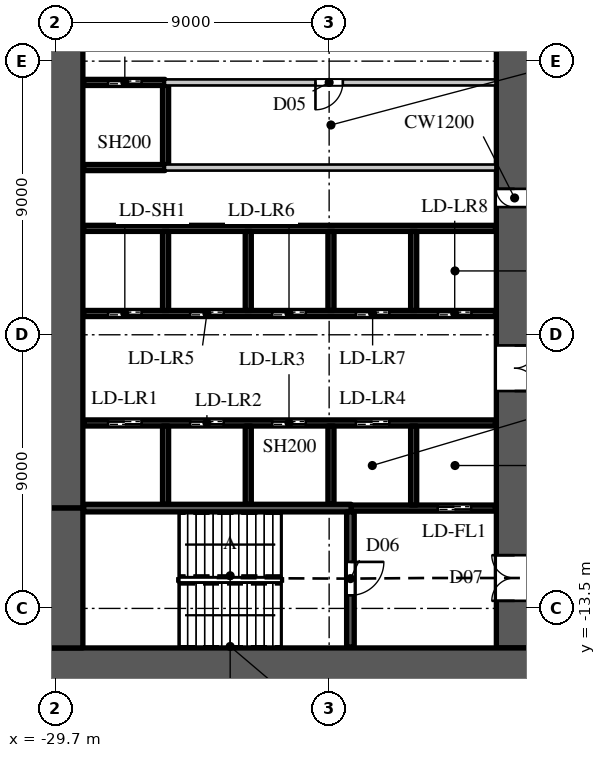
"""IFC4 building model, lengths in metres.
Left out: names, types, materials, properties, quantities, classifications, styles, units other than length and angle.
Written with IfcOpenShell. Run it as: python <this file> out.ifc"""

import sys

from ifc_helpers import new_model, si_unit, direction, frame, frame_2d, origin, place, context, subcontext, project, spatial, rectangle, extrude, element, fill, save


model = new_model("IFC4")
c1 = context("Model", 3, precision=1e-05, world=origin(), true_north=direction((0.0, 1.0)))
c2 = subcontext(c1, "Body", "Model", "MODEL_VIEW")
j1 = project(units=[si_unit("LENGTHUNIT", "METRE"), si_unit("PLANEANGLEUNIT", "RADIAN")], contexts=[c1])
p1 = place(None, origin())
s1 = spatial("IfcSite", under=j1, at=p1, CompositionType="ELEMENT")
p2 = place(p1, origin())
s2 = spatial("IfcBuilding", under=s1, at=p2, CompositionType="ELEMENT")
p3 = place(p2, origin())
s3 = spatial("IfcBuildingStorey", under=s2, at=p3, CompositionType="ELEMENT", Elevation=0.0)
p4 = place(p3, frame((-30.0, -15.4, 0.0), z_axis=(0.0, 0.0, 1.0), x_axis=(1.0, 0.0, 0.0)))
e1 = element("IfcWall", 1, at=p4, inside=s3, PredefinedType="SHEAR", context=c2, shape_type="SweptSolid", body=[
    extrude(rectangle(XDim=16.0, YDim=1.2, at=frame_2d((8.0, 0.0))), origin(), (0.0, 0.0, 1.0), 9.0),
])
p5 = place(p3, frame((-14.6, -14.8, 0.0), z_axis=(0.0, 0.0, 1.0), x_axis=(0.0, 1.0, 0.0)))
e2 = element("IfcWall", 2, at=p5, inside=s3, PredefinedType="SHEAR", context=c2, shape_type="SweptSolid", body=[
    extrude(rectangle(XDim=29.6, YDim=1.2, at=frame_2d((14.8, 0.0))), origin(), (0.0, 0.0, 1.0), 9.0),
])
p6 = place(p5, frame((1.55, 0.0, 0.0)))
e3 = element("IfcOpeningElement", 3, at=p6, cuts=e2, PredefinedType="OPENING", context=c2, shape_type="SweptSolid", body=[
    extrude(rectangle(XDim=1.5, YDim=2.4, at=frame_2d((0.75, 1.2))), frame((0.0, 0.61, 0.0), z_axis=(0.0, -1.0, 0.0), x_axis=(1.0, 0.0, 0.0)), (0.0, 0.0, 1.0), 1.22),
])
p7 = place(p5, frame((26.55, 0.0, 0.0)))
e4 = element("IfcOpeningElement", 4, at=p7, cuts=e2, PredefinedType="OPENING", context=c2, shape_type="SweptSolid", body=[
    extrude(rectangle(XDim=1.5, YDim=2.4, at=frame_2d((0.75, 1.2))), frame((0.0, 0.61, 0.0), z_axis=(0.0, -1.0, 0.0), x_axis=(1.0, 0.0, 0.0)), (0.0, 0.0, 1.0), 1.22),
])
p8 = place(p5, frame((8.45, 0.0, 0.0)))
e5 = element("IfcOpeningElement", 5, at=p8, cuts=e2, PredefinedType="OPENING", context=c2, shape_type="SweptSolid", body=[
    extrude(rectangle(XDim=1.5, YDim=2.4, at=frame_2d((0.75, 1.2))), frame((0.0, 0.61, 0.0), z_axis=(0.0, -1.0, 0.0), x_axis=(1.0, 0.0, 0.0)), (0.0, 0.0, 1.0), 1.22),
])
p9 = place(p5, frame((19.65, 0.0, 0.0)))
e6 = element("IfcOpeningElement", 6, at=p9, cuts=e2, PredefinedType="OPENING", context=c2, shape_type="SweptSolid", body=[
    extrude(rectangle(XDim=1.5, YDim=2.4, at=frame_2d((0.75, 1.2))), frame((0.0, 0.61, 0.0), z_axis=(0.0, -1.0, 0.0), x_axis=(1.0, 0.0, 0.0)), (0.0, 0.0, 1.0), 1.22),
])
p10 = place(p5, frame((14.5, 0.0, 0.0)))
e7 = element("IfcOpeningElement", 7, at=p10, cuts=e2, PredefinedType="OPENING", context=c2, shape_type="SweptSolid", body=[
    extrude(rectangle(XDim=0.6, YDim=2.0, at=frame_2d((0.3, 1.0))), frame((0.0, 0.61, 0.0), z_axis=(0.0, -1.0, 0.0), x_axis=(1.0, 0.0, 0.0)), (0.0, 0.0, 1.0), 1.22),
])
p11 = place(p3, frame((-29.4, -10.2, 0.0), z_axis=(0.0, 0.0, 1.0), x_axis=(0.0, 1.0, 0.0)))
e8 = element("IfcWall", 8, at=p11, inside=s3, PredefinedType="SHEAR", context=c2, shape_type="SweptSolid", body=[
    extrude(rectangle(XDim=20.4, YDim=1.2, at=frame_2d((10.2, 0.0))), origin(), (0.0, 0.0, 1.0), 9.0),
])
p12 = place(p3, frame((-29.4, -14.8, 0.0), z_axis=(0.0, 0.0, 1.0), x_axis=(0.0, 1.0, 0.0)))
e9 = element("IfcWall", 9, at=p12, inside=s3, PredefinedType="SHEAR", context=c2, shape_type="SweptSolid", body=[
    extrude(rectangle(XDim=4.6, YDim=1.2, at=frame_2d((2.3, 0.0))), origin(), (0.0, 0.0, 1.0), 9.0),
])
p13 = place(p3, frame((-26.1, 1.0, 0.0), z_axis=(0.0, 0.0, 1.0), x_axis=(1.0, 0.0, 0.0)))
e10 = element("IfcWall", 10, at=p13, inside=s3, PredefinedType="PARTITIONING", context=c2, shape_type="SweptSolid", body=[
    extrude(rectangle(XDim=10.87, YDim=0.2, at=frame_2d((5.435, 0.0))), origin(), (0.0, 0.0, 1.0), 8.598),
])
p14 = place(p3, frame((-26.1, 3.8, 0.0), z_axis=(0.0, 0.0, 1.0), x_axis=(1.0, 0.0, 0.0)))
e11 = element("IfcWall", 11, at=p14, inside=s3, PredefinedType="PARTITIONING", context=c2, shape_type="SweptSolid", body=[
    extrude(rectangle(XDim=10.87, YDim=0.2, at=frame_2d((5.435, 0.0))), origin(), (0.0, 0.0, 1.0), 8.598),
])
p15 = place(p14, frame((4.95, 0.0, 0.0)))
e12 = element("IfcOpeningElement", 12, at=p15, cuts=e11, PredefinedType="OPENING", context=c2, shape_type="SweptSolid", body=[
    extrude(rectangle(XDim=0.9, YDim=2.2, at=frame_2d((0.45, 1.1))), frame((0.0, 0.11, 0.0), z_axis=(0.0, -1.0, 0.0), x_axis=(1.0, 0.0, 0.0)), (0.0, 0.0, 1.0), 0.22),
])
p16 = place(p3, frame((-28.77, -7.4, 0.0), z_axis=(0.0, 0.0, 1.0), x_axis=(1.0, 0.0, 0.0)))
e13 = element("IfcWall", 13, at=p16, inside=s3, PredefinedType="SHEAR", context=c2, shape_type="SweptSolid", body=[
    extrude(rectangle(XDim=13.54, YDim=0.2, at=frame_2d((6.77, 0.0))), origin(), (0.0, 0.0, 1.0), 8.598),
])
p17 = place(p16, frame((0.8, 0.0, 0.0)))
e14 = element("IfcOpeningElement", 14, at=p17, cuts=e13, PredefinedType="OPENING", context=c2, shape_type="SweptSolid", body=[
    extrude(rectangle(XDim=1.1, YDim=2.2, at=frame_2d((0.55, 1.1))), frame((0.0, 0.11, 0.0), z_axis=(0.0, -1.0, 0.0), x_axis=(1.0, 0.0, 0.0)), (0.0, 0.0, 1.0), 0.22),
])
p18 = place(p16, frame((3.5, 0.0, 0.0)))
e15 = element("IfcOpeningElement", 15, at=p18, cuts=e13, PredefinedType="OPENING", context=c2, shape_type="SweptSolid", body=[
    extrude(rectangle(XDim=1.1, YDim=2.2, at=frame_2d((0.55, 1.1))), frame((0.0, 0.11, 0.0), z_axis=(0.0, -1.0, 0.0), x_axis=(1.0, 0.0, 0.0)), (0.0, 0.0, 1.0), 0.22),
])
p19 = place(p16, frame((6.2, 0.0, 0.0)))
e16 = element("IfcOpeningElement", 16, at=p19, cuts=e13, PredefinedType="OPENING", context=c2, shape_type="SweptSolid", body=[
    extrude(rectangle(XDim=1.1, YDim=2.2, at=frame_2d((0.55, 1.1))), frame((0.0, 0.11, 0.0), z_axis=(0.0, -1.0, 0.0), x_axis=(1.0, 0.0, 0.0)), (0.0, 0.0, 1.0), 0.22),
])
p20 = place(p16, frame((8.95, 0.0, 0.0)))
e17 = element("IfcOpeningElement", 17, at=p20, cuts=e13, PredefinedType="OPENING", context=c2, shape_type="SweptSolid", body=[
    extrude(rectangle(XDim=1.1, YDim=2.2, at=frame_2d((0.55, 1.1))), frame((0.0, 0.11, 0.0), z_axis=(0.0, -1.0, 0.0), x_axis=(1.0, 0.0, 0.0)), (0.0, 0.0, 1.0), 0.22),
])
p21 = place(p3, frame((-28.77, -3.8, 0.0), z_axis=(0.0, 0.0, 1.0), x_axis=(1.0, 0.0, 0.0)))
e18 = element("IfcWall", 18, at=p21, inside=s3, PredefinedType="SHEAR", context=c2, shape_type="SweptSolid", body=[
    extrude(rectangle(XDim=13.54, YDim=0.2, at=frame_2d((6.77, 0.0))), origin(), (0.0, 0.0, 1.0), 8.598),
])
p22 = place(p21, frame((0.8, 0.0, 0.0)))
e19 = element("IfcOpeningElement", 19, at=p22, cuts=e18, PredefinedType="OPENING", context=c2, shape_type="SweptSolid", body=[
    extrude(rectangle(XDim=1.1, YDim=2.2, at=frame_2d((0.55, 1.1))), frame((0.0, 0.11, 0.0), z_axis=(0.0, -1.0, 0.0), x_axis=(1.0, 0.0, 0.0)), (0.0, 0.0, 1.0), 0.22),
])
p23 = place(p21, frame((3.5, 0.0, 0.0)))
e20 = element("IfcOpeningElement", 20, at=p23, cuts=e18, PredefinedType="OPENING", context=c2, shape_type="SweptSolid", body=[
    extrude(rectangle(XDim=1.1, YDim=2.2, at=frame_2d((0.55, 1.1))), frame((0.0, 0.11, 0.0), z_axis=(0.0, -1.0, 0.0), x_axis=(1.0, 0.0, 0.0)), (0.0, 0.0, 1.0), 0.22),
])
p24 = place(p21, frame((6.2, 0.0, 0.0)))
e21 = element("IfcOpeningElement", 21, at=p24, cuts=e18, PredefinedType="OPENING", context=c2, shape_type="SweptSolid", body=[
    extrude(rectangle(XDim=1.1, YDim=2.2, at=frame_2d((0.55, 1.1))), frame((0.0, 0.11, 0.0), z_axis=(0.0, -1.0, 0.0), x_axis=(1.0, 0.0, 0.0)), (0.0, 0.0, 1.0), 0.22),
])
p25 = place(p21, frame((8.95, 0.0, 0.0)))
e22 = element("IfcOpeningElement", 22, at=p25, cuts=e18, PredefinedType="OPENING", context=c2, shape_type="SweptSolid", body=[
    extrude(rectangle(XDim=1.1, YDim=2.2, at=frame_2d((0.55, 1.1))), frame((0.0, 0.11, 0.0), z_axis=(0.0, -1.0, 0.0), x_axis=(1.0, 0.0, 0.0)), (0.0, 0.0, 1.0), 0.22),
])
p26 = place(p21, frame((11.65, 0.0, 0.0)))
e23 = element("IfcOpeningElement", 23, at=p26, cuts=e18, PredefinedType="OPENING", context=c2, shape_type="SweptSolid", body=[
    extrude(rectangle(XDim=1.1, YDim=2.2, at=frame_2d((0.55, 1.1))), frame((0.0, 0.11, 0.0), z_axis=(0.0, -1.0, 0.0), x_axis=(1.0, 0.0, 0.0)), (0.0, 0.0, 1.0), 0.22),
])
p27 = place(p3, frame((-28.77, -1.0, 0.0), z_axis=(0.0, 0.0, 1.0), x_axis=(1.0, 0.0, 0.0)))
e24 = element("IfcWall", 24, at=p27, inside=s3, PredefinedType="SHEAR", context=c2, shape_type="SweptSolid", body=[
    extrude(rectangle(XDim=13.54, YDim=0.2, at=frame_2d((6.77, 0.0))), origin(), (0.0, 0.0, 1.0), 8.598),
])
p28 = place(p3, frame((-28.77, 1.0, 0.0), z_axis=(0.0, 0.0, 1.0), x_axis=(1.0, 0.0, 0.0)))
e25 = element("IfcWall", 25, at=p28, inside=s3, PredefinedType="SHEAR", context=c2, shape_type="SweptSolid", body=[
    extrude(rectangle(XDim=2.67, YDim=0.2, at=frame_2d((1.335, 0.0))), origin(), (0.0, 0.0, 1.0), 8.598),
])
p29 = place(p3, frame((-28.77, 3.8, 0.0), z_axis=(0.0, 0.0, 1.0), x_axis=(1.0, 0.0, 0.0)))
e26 = element("IfcWall", 26, at=p29, inside=s3, PredefinedType="SHEAR", context=c2, shape_type="SweptSolid", body=[
    extrude(rectangle(XDim=2.67, YDim=0.2, at=frame_2d((1.335, 0.0))), origin(), (0.0, 0.0, 1.0), 8.598),
])
p30 = place(p29, frame((0.8, 0.0, 0.0)))
e27 = element("IfcOpeningElement", 27, at=p30, cuts=e26, PredefinedType="OPENING", context=c2, shape_type="SweptSolid", body=[
    extrude(rectangle(XDim=1.1, YDim=2.2, at=frame_2d((0.55, 1.1))), frame((0.0, 0.11, 0.0), z_axis=(0.0, -1.0, 0.0), x_axis=(1.0, 0.0, 0.0)), (0.0, 0.0, 1.0), 0.22),
])
p31 = place(p3, frame((-26.08, -10.075, 0.0), z_axis=(0.0, 0.0, 1.0), x_axis=(0.0, 1.0, 0.0)))
e28 = element("IfcWall", 28, at=p31, inside=s3, PredefinedType="SHEAR", context=c2, shape_type="SweptSolid", body=[
    extrude(rectangle(XDim=2.575, YDim=0.2, at=frame_2d((1.288, 0.0))), origin(), (0.0, 0.0, 1.0), 9.0),
])
p32 = place(p3, frame((-26.08, -3.7, 0.0), z_axis=(0.0, 0.0, 1.0), x_axis=(0.0, 1.0, 0.0)))
e29 = element("IfcWall", 29, at=p32, inside=s3, PredefinedType="SHEAR", context=c2, shape_type="SweptSolid", body=[
    extrude(rectangle(XDim=2.6, YDim=0.2, at=frame_2d((1.3, 0.0))), origin(), (0.0, 0.0, 1.0), 9.0),
])
p33 = place(p3, frame((-26.08, 1.1, 0.0), z_axis=(0.0, 0.0, 1.0), x_axis=(0.0, 1.0, 0.0)))
e30 = element("IfcWall", 30, at=p33, inside=s3, PredefinedType="SHEAR", context=c2, shape_type="SweptSolid", body=[
    extrude(rectangle(XDim=2.6, YDim=0.2, at=frame_2d((1.3, 0.0))), origin(), (0.0, 0.0, 1.0), 8.598),
])
p34 = place(p3, frame((-23.36, -10.075, 0.0), z_axis=(0.0, 0.0, 1.0), x_axis=(0.0, 1.0, 0.0)))
e31 = element("IfcWall", 31, at=p34, inside=s3, PredefinedType="SHEAR", context=c2, shape_type="SweptSolid", body=[
    extrude(rectangle(XDim=2.575, YDim=0.2, at=frame_2d((1.288, 0.0))), origin(), (0.0, 0.0, 1.0), 9.0),
])
p35 = place(p3, frame((-23.36, -3.7, 0.0), z_axis=(0.0, 0.0, 1.0), x_axis=(0.0, 1.0, 0.0)))
e32 = element("IfcWall", 32, at=p35, inside=s3, PredefinedType="SHEAR", context=c2, shape_type="SweptSolid", body=[
    extrude(rectangle(XDim=2.6, YDim=0.2, at=frame_2d((1.3, 0.0))), origin(), (0.0, 0.0, 1.0), 9.0),
])
p36 = place(p3, frame((-20.64, -10.075, 0.0), z_axis=(0.0, 0.0, 1.0), x_axis=(0.0, 1.0, 0.0)))
e33 = element("IfcWall", 33, at=p36, inside=s3, PredefinedType="SHEAR", context=c2, shape_type="SweptSolid", body=[
    extrude(rectangle(XDim=2.575, YDim=0.2, at=frame_2d((1.288, 0.0))), origin(), (0.0, 0.0, 1.0), 9.0),
])
p37 = place(p3, frame((-20.64, -3.7, 0.0), z_axis=(0.0, 0.0, 1.0), x_axis=(0.0, 1.0, 0.0)))
e34 = element("IfcWall", 34, at=p37, inside=s3, PredefinedType="SHEAR", context=c2, shape_type="SweptSolid", body=[
    extrude(rectangle(XDim=2.6, YDim=0.2, at=frame_2d((1.3, 0.0))), origin(), (0.0, 0.0, 1.0), 9.0),
])
p38 = place(p3, frame((-19.98, -10.2, 0.0), z_axis=(0.0, 0.0, 1.0), x_axis=(1.0, 0.0, 0.0)))
e35 = element("IfcWall", 35, at=p38, inside=s3, PredefinedType="SHEAR", context=c2, shape_type="SweptSolid", body=[
    extrude(rectangle(XDim=4.75, YDim=0.2, at=frame_2d((2.375, 0.0))), origin(), (0.0, 0.0, 1.0), 8.598),
])
p39 = place(p38, frame((2.85, 0.0, 0.0)))
e36 = element("IfcOpeningElement", 36, at=p39, cuts=e35, PredefinedType="OPENING", context=c2, shape_type="SweptSolid", body=[
    extrude(rectangle(XDim=1.1, YDim=2.2, at=frame_2d((0.55, 1.1))), frame((0.0, 0.11, 0.0), z_axis=(0.0, -1.0, 0.0), x_axis=(1.0, 0.0, 0.0)), (0.0, 0.0, 1.0), 0.22),
])
p40 = place(p3, frame((-17.92, -10.1, 0.0), z_axis=(0.0, 0.0, 1.0), x_axis=(0.0, 1.0, 0.0)))
e37 = element("IfcWall", 37, at=p40, inside=s3, PredefinedType="SHEAR", context=c2, shape_type="SweptSolid", body=[
    extrude(rectangle(XDim=2.6, YDim=0.2, at=frame_2d((1.3, 0.0))), origin(), (0.0, 0.0, 1.0), 9.0),
])
p41 = place(p3, frame((-17.92, -3.7, 0.0), z_axis=(0.0, 0.0, 1.0), x_axis=(0.0, 1.0, 0.0)))
e38 = element("IfcWall", 38, at=p41, inside=s3, PredefinedType="SHEAR", context=c2, shape_type="SweptSolid", body=[
    extrude(rectangle(XDim=2.6, YDim=0.2, at=frame_2d((1.3, 0.0))), origin(), (0.0, 0.0, 1.0), 9.0),
])
p42 = place(p3, frame((-28.77, -10.2, 0.0), z_axis=(0.0, 0.0, 1.0), x_axis=(1.0, 0.0, 0.0)))
e39 = element("IfcWall", 39, at=p42, inside=s3, PredefinedType="SHEAR", context=c2, shape_type="SweptSolid", body=[
    extrude(rectangle(XDim=8.79, YDim=0.25, at=frame_2d((4.395, 0.0))), origin(), (0.0, 0.0, 1.0), 8.598),
])
p43 = place(p3, frame((-20.0, -14.77, 0.0), z_axis=(0.0, 0.0, 1.0), x_axis=(0.0, 1.0, 0.0)))
e40 = element("IfcWall", 40, at=p43, inside=s3, PredefinedType="SHEAR", context=c2, shape_type="SweptSolid", body=[
    extrude(rectangle(XDim=4.445, YDim=0.25, at=frame_2d((2.223, 0.0))), origin(), (0.0, 0.0, 1.0), 8.598),
])
p44 = place(p43, frame((1.7, 0.0, 0.0)))
e41 = element("IfcOpeningElement", 41, at=p44, cuts=e40, PredefinedType="OPENING", context=c2, shape_type="SweptSolid", body=[
    extrude(rectangle(XDim=1.1, YDim=2.2, at=frame_2d((0.55, 1.1))), frame((0.0, 0.135, 0.0), z_axis=(0.0, -1.0, 0.0), x_axis=(1.0, 0.0, 0.0)), (0.0, 0.0, 1.0), 0.27),
])
p45 = place(p44, origin())
e42 = element("IfcDoor", 42, at=p45, inside=s3, OperationType="SINGLE_SWING_LEFT", PredefinedType="DOOR", context=c2, shape_type="SweptSolid", body=[
    extrude(rectangle(XDim=1.1, YDim=2.2, at=frame_2d((0.55, 1.1))), frame((0.0, 0.025, 0.0), z_axis=(0.0, -1.0, 0.0), x_axis=(1.0, 0.0, 0.0)), (0.0, 0.0, 1.0), 0.05),
])
fill(e41, e42)
p46 = place(p15, origin())
e43 = element("IfcDoor", 43, at=p46, inside=s3, OperationType="SINGLE_SWING_RIGHT", PredefinedType="DOOR", context=c2, shape_type="SweptSolid", body=[
    extrude(rectangle(XDim=0.9, YDim=2.2, at=frame_2d((0.45, 1.1))), frame((0.0, 0.025, 0.0), z_axis=(0.0, -1.0, 0.0), x_axis=(1.0, 0.0, 0.0)), (0.0, 0.0, 1.0), 0.05),
])
fill(e12, e43)
p47 = place(p17, origin())
e44 = element("IfcDoor", 44, at=p47, inside=s3, OperationType="DOUBLE_DOOR_SLIDING", PredefinedType="DOOR", context=c2, shape_type="SweptSolid", body=[
    extrude(rectangle(XDim=1.1, YDim=2.2, at=frame_2d((0.55, 1.1))), frame((0.0, 0.025, 0.0), z_axis=(0.0, -1.0, 0.0), x_axis=(1.0, 0.0, 0.0)), (0.0, 0.0, 1.0), 0.05),
])
fill(e14, e44)
p48 = place(p18, origin())
e45 = element("IfcDoor", 45, at=p48, inside=s3, OperationType="DOUBLE_DOOR_SLIDING", PredefinedType="DOOR", context=c2, shape_type="SweptSolid", body=[
    extrude(rectangle(XDim=1.1, YDim=2.2, at=frame_2d((0.55, 1.1))), frame((0.0, 0.025, 0.0), z_axis=(0.0, -1.0, 0.0), x_axis=(1.0, 0.0, 0.0)), (0.0, 0.0, 1.0), 0.05),
])
fill(e15, e45)
p49 = place(p19, origin())
e46 = element("IfcDoor", 46, at=p49, inside=s3, OperationType="DOUBLE_DOOR_SLIDING", PredefinedType="DOOR", context=c2, shape_type="SweptSolid", body=[
    extrude(rectangle(XDim=1.1, YDim=2.2, at=frame_2d((0.55, 1.1))), frame((0.0, 0.025, 0.0), z_axis=(0.0, -1.0, 0.0), x_axis=(1.0, 0.0, 0.0)), (0.0, 0.0, 1.0), 0.05),
])
fill(e16, e46)
p50 = place(p20, origin())
e47 = element("IfcDoor", 47, at=p50, inside=s3, OperationType="DOUBLE_DOOR_SLIDING", PredefinedType="DOOR", context=c2, shape_type="SweptSolid", body=[
    extrude(rectangle(XDim=1.1, YDim=2.2, at=frame_2d((0.55, 1.1))), frame((0.0, 0.025, 0.0), z_axis=(0.0, -1.0, 0.0), x_axis=(1.0, 0.0, 0.0)), (0.0, 0.0, 1.0), 0.05),
])
fill(e17, e47)
p51 = place(p39, origin())
e48 = element("IfcDoor", 48, at=p51, inside=s3, OperationType="DOUBLE_DOOR_SLIDING", PredefinedType="DOOR", context=c2, shape_type="SweptSolid", body=[
    extrude(rectangle(XDim=1.1, YDim=2.2, at=frame_2d((0.55, 1.1))), frame((0.0, 0.025, 0.0), z_axis=(0.0, -1.0, 0.0), x_axis=(1.0, 0.0, 0.0)), (0.0, 0.0, 1.0), 0.05),
])
fill(e36, e48)
p52 = place(p22, origin())
e49 = element("IfcDoor", 49, at=p52, inside=s3, OperationType="DOUBLE_DOOR_SLIDING", PredefinedType="DOOR", context=c2, shape_type="SweptSolid", body=[
    extrude(rectangle(XDim=1.1, YDim=2.2, at=frame_2d((0.55, 1.1))), frame((0.0, 0.025, 0.0), z_axis=(0.0, -1.0, 0.0), x_axis=(1.0, 0.0, 0.0)), (0.0, 0.0, 1.0), 0.05),
])
fill(e19, e49)
p53 = place(p23, origin())
e50 = element("IfcDoor", 50, at=p53, inside=s3, OperationType="DOUBLE_DOOR_SLIDING", PredefinedType="DOOR", context=c2, shape_type="SweptSolid", body=[
    extrude(rectangle(XDim=1.1, YDim=2.2, at=frame_2d((0.55, 1.1))), frame((0.0, 0.025, 0.0), z_axis=(0.0, -1.0, 0.0), x_axis=(1.0, 0.0, 0.0)), (0.0, 0.0, 1.0), 0.05),
])
fill(e20, e50)
p54 = place(p24, origin())
e51 = element("IfcDoor", 51, at=p54, inside=s3, OperationType="DOUBLE_DOOR_SLIDING", PredefinedType="DOOR", context=c2, shape_type="SweptSolid", body=[
    extrude(rectangle(XDim=1.1, YDim=2.2, at=frame_2d((0.55, 1.1))), frame((0.0, 0.025, 0.0), z_axis=(0.0, -1.0, 0.0), x_axis=(1.0, 0.0, 0.0)), (0.0, 0.0, 1.0), 0.05),
])
fill(e21, e51)
p55 = place(p25, origin())
e52 = element("IfcDoor", 52, at=p55, inside=s3, OperationType="DOUBLE_DOOR_SLIDING", PredefinedType="DOOR", context=c2, shape_type="SweptSolid", body=[
    extrude(rectangle(XDim=1.1, YDim=2.2, at=frame_2d((0.55, 1.1))), frame((0.0, 0.025, 0.0), z_axis=(0.0, -1.0, 0.0), x_axis=(1.0, 0.0, 0.0)), (0.0, 0.0, 1.0), 0.05),
])
fill(e22, e52)
p56 = place(p26, origin())
e53 = element("IfcDoor", 53, at=p56, inside=s3, OperationType="DOUBLE_DOOR_SLIDING", PredefinedType="DOOR", context=c2, shape_type="SweptSolid", body=[
    extrude(rectangle(XDim=1.1, YDim=2.2, at=frame_2d((0.55, 1.1))), frame((0.0, 0.025, 0.0), z_axis=(0.0, -1.0, 0.0), x_axis=(1.0, 0.0, 0.0)), (0.0, 0.0, 1.0), 0.05),
])
fill(e23, e53)
p57 = place(p30, origin())
e54 = element("IfcDoor", 54, at=p57, inside=s3, OperationType="DOUBLE_DOOR_SLIDING", PredefinedType="DOOR", context=c2, shape_type="SweptSolid", body=[
    extrude(rectangle(XDim=1.1, YDim=2.2, at=frame_2d((0.55, 1.1))), frame((0.0, 0.025, 0.0), z_axis=(0.0, -1.0, 0.0), x_axis=(1.0, 0.0, 0.0)), (0.0, 0.0, 1.0), 0.05),
])
fill(e27, e54)
p58 = place(p6, origin())
e55 = element("IfcDoor", 55, at=p58, inside=s3, OperationType="DOUBLE_DOOR_SINGLE_SWING", PredefinedType="DOOR", context=c2, shape_type="SweptSolid", body=[
    extrude(rectangle(XDim=1.5, YDim=2.4, at=frame_2d((0.75, 1.2))), frame((0.0, 0.025, 0.0), z_axis=(0.0, -1.0, 0.0), x_axis=(1.0, 0.0, 0.0)), (0.0, 0.0, 1.0), 0.05),
])
fill(e3, e55)
p59 = place(p8, origin())
e56 = element("IfcDoor", 56, at=p59, inside=s3, OperationType="DOUBLE_DOOR_SINGLE_SWING", PredefinedType="DOOR", context=c2, shape_type="SweptSolid", body=[
    extrude(rectangle(XDim=1.5, YDim=2.4, at=frame_2d((0.75, 1.2))), frame((0.0, 0.025, 0.0), z_axis=(0.0, -1.0, 0.0), x_axis=(1.0, 0.0, 0.0)), (0.0, 0.0, 1.0), 0.05),
])
fill(e5, e56)
p60 = place(p10, origin())
e57 = element("IfcDoor", 57, at=p60, inside=s3, OperationType="SINGLE_SWING_RIGHT", PredefinedType="DOOR", context=c2, shape_type="SweptSolid", body=[
    extrude(rectangle(XDim=0.6, YDim=2.0, at=frame_2d((0.3, 1.0))), frame((0.0, 0.025, 0.0), z_axis=(0.0, -1.0, 0.0), x_axis=(1.0, 0.0, 0.0)), (0.0, 0.0, 1.0), 0.05),
])
fill(e7, e57)
save(model, sys.argv[1])
